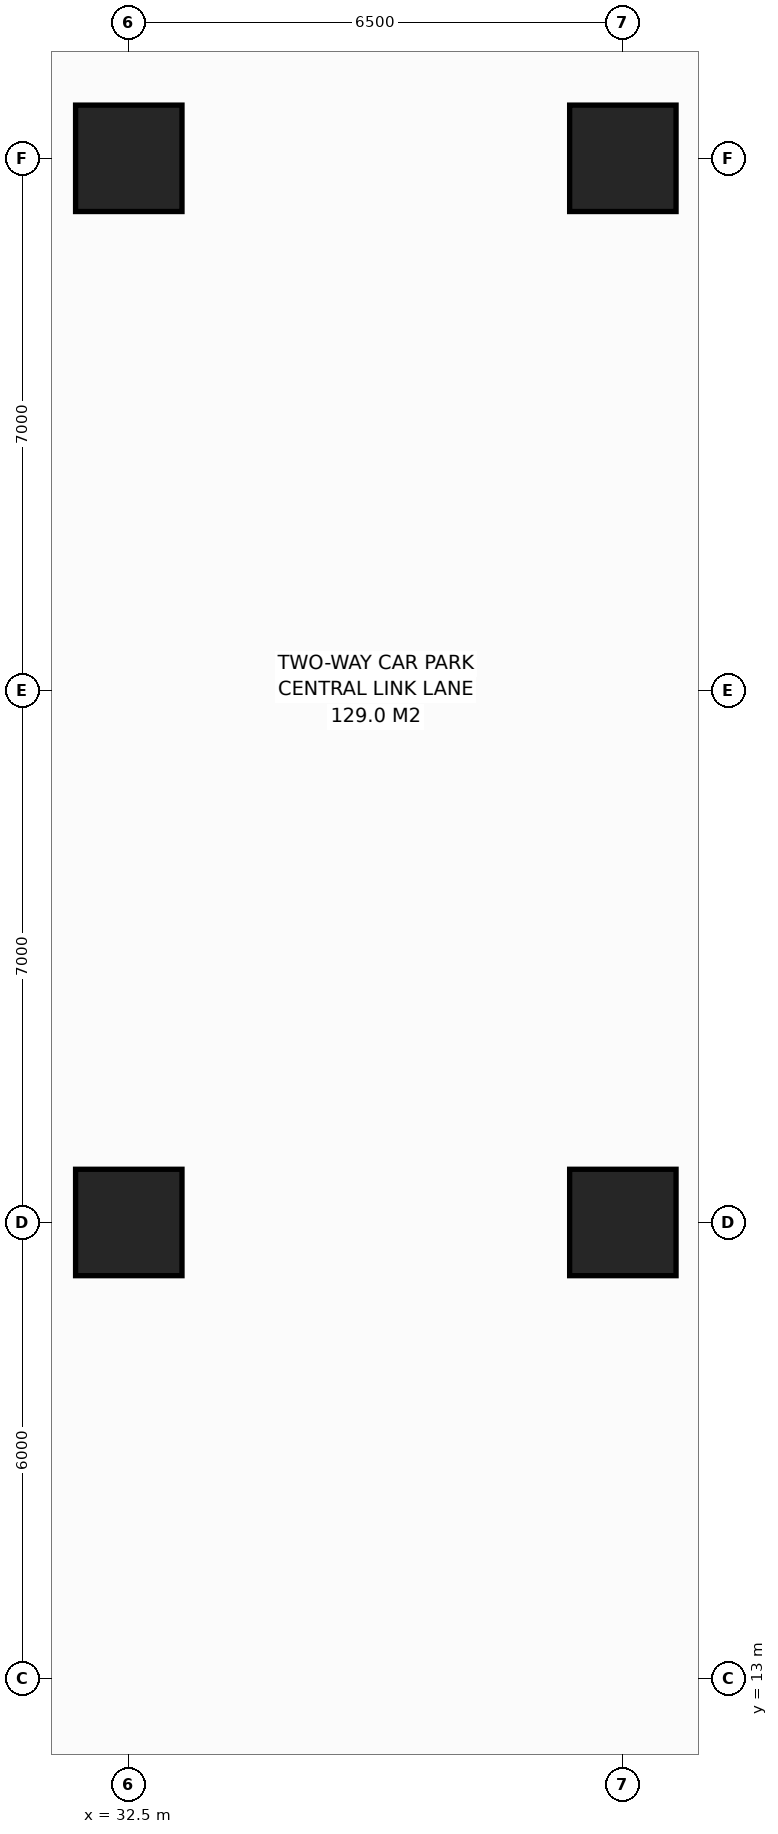
"""IFC4 building model, lengths in metres.
Left out: names, types, materials, properties, quantities, classifications, styles, units other than length and angle.
Written with IfcOpenShell. Run it as: python <this file> out.ifc"""

import sys

from ifc_helpers import new_model, si_unit, direction, frame, origin, origin_2d, place, context, subcontext, project, spatial, rectangle, extrude, element, save


model = new_model("IFC4")
c1 = context("Model", 3, precision=1e-05, world=origin(), true_north=direction((0.0, 1.0)))
c2 = subcontext(c1, "Body", "Model", "MODEL_VIEW")
j1 = project(units=[si_unit("LENGTHUNIT", "METRE"), si_unit("PLANEANGLEUNIT", "RADIAN")], contexts=[c1])
p1 = place(None, origin())
s1 = spatial("IfcSite", under=j1, at=p1, CompositionType="ELEMENT")
p2 = place(p1, origin())
s2 = spatial("IfcBuilding", under=s1, at=p2, CompositionType="ELEMENT")
p3 = place(p2, frame((0.0, 0.0, -4.5)))
s3 = spatial("IfcBuildingStorey", under=s2, at=p3, CompositionType="ELEMENT", Elevation=-4.5)
for number, where, z_axis, x_axis in (
    (1, (32.5, 19.0, 0.0), (0.0, 0.0, 1.0), (1.0, 0.0, 0.0)),
    (2, (32.5, 33.0, 0.0), (0.0, 0.0, 1.0), (1.0, 0.0, 0.0)),
    (3, (39.0, 19.0, 0.0), (0.0, 0.0, 1.0), (1.0, 0.0, 0.0)),
    (4, (39.0, 33.0, 0.0), (0.0, 0.0, 1.0), (1.0, 0.0, 0.0)),
):
    element("IfcColumn", number, at=place(p3, frame(where, z_axis=z_axis, x_axis=x_axis)), inside=s3, PredefinedType="COLUMN", context=c2, shape_type="SweptSolid", body=[
        extrude(rectangle(XDim=1.4, YDim=1.4, at=origin_2d()), origin(), (0.0, 0.0, 1.0), 4.5),
    ])
save(model, sys.argv[1])
